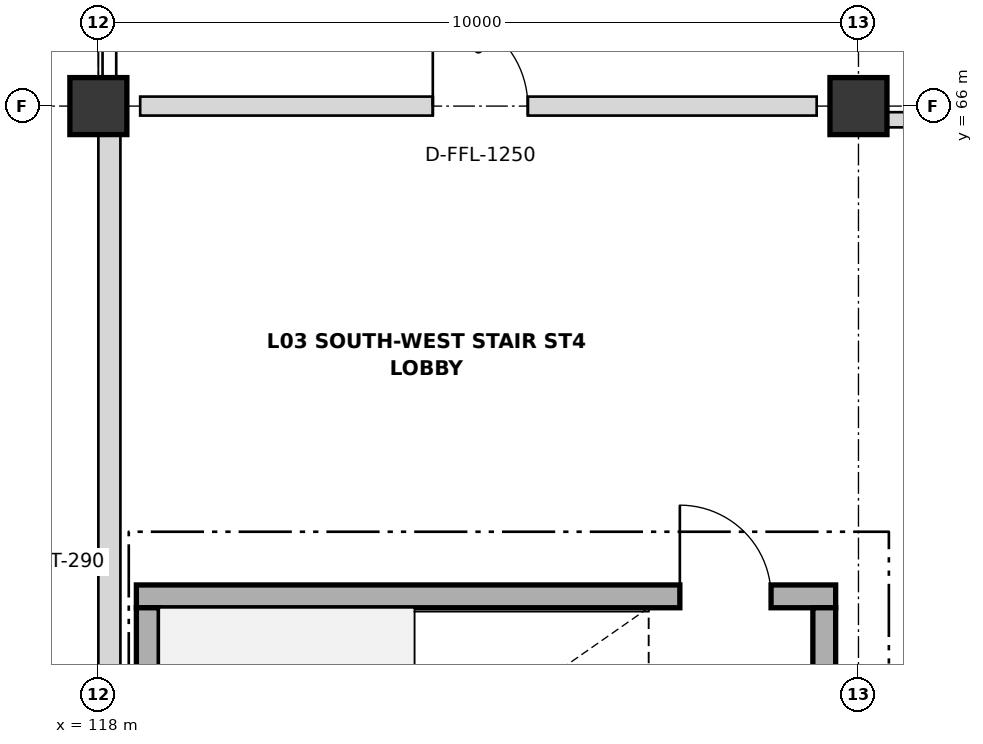
"""IFC4 building model, lengths in metres.
Left out: names, types, materials, properties, quantities, classifications, styles, units other than length and angle.
Written with IfcOpenShell. Run it as: python <this file> out.ifc"""

import sys

from ifc_helpers import new_model, si_unit, direction, frame, frame_2d, origin, origin_2d, place, context, subcontext, project, spatial, rectangle, extrude, element, fill, save


model = new_model("IFC4")
c1 = context("Model", 3, precision=1e-05, world=origin(), true_north=direction((0.0, 1.0)))
c2 = subcontext(c1, "Body", "Model", "MODEL_VIEW")
j1 = project(units=[si_unit("LENGTHUNIT", "METRE"), si_unit("PLANEANGLEUNIT", "RADIAN")], contexts=[c1])
p1 = place(None, origin())
s1 = spatial("IfcSite", under=j1, at=p1, CompositionType="ELEMENT")
p2 = place(p1, origin())
s2 = spatial("IfcBuilding", under=s1, at=p2, CompositionType="ELEMENT")
p3 = place(p2, frame((0.0, 0.0, 14.4)))
s3 = spatial("IfcBuildingStorey", under=s2, at=p3, CompositionType="ELEMENT", Elevation=14.4)
for number, where, z_axis, x_axis in (
    (1, (118.0, 66.0, 0.0), (0.0, 0.0, 1.0), (1.0, 0.0, 0.0)),
    (2, (128.0, 66.0, 0.0), (0.0, 0.0, 1.0), (1.0, 0.0, 0.0)),
):
    element("IfcColumn", number, at=place(p3, frame(where, z_axis=z_axis, x_axis=x_axis)), inside=s3, PredefinedType="COLUMN", context=c2, shape_type="SweptSolid", body=[
        extrude(rectangle(XDim=0.75, YDim=0.75, at=origin_2d()), origin(), (0.0, 0.0, 1.0), 4.2),
    ])
p4 = place(p3, frame((118.145, 54.37, 0.0), z_axis=(0.0, 0.0, 1.0), x_axis=(0.0, 1.0, 0.0)))
e3 = element("IfcWall", 3, at=p4, inside=s3, PredefinedType="SOLIDWALL", context=c2, shape_type="SweptSolid", body=[
    extrude(rectangle(XDim=11.26, YDim=0.29, at=frame_2d((5.63, 0.0))), origin(), (0.0, 0.0, 1.0), 3.078),
])
p5 = place(p3, frame((118.5, 59.55, 0.0), z_axis=(0.0, 0.0, 1.0), x_axis=(1.0, 0.0, 0.0)))
e4 = element("IfcWall", 4, at=p5, inside=s3, PredefinedType="SHEAR", context=c2, shape_type="SweptSolid", body=[
    extrude(rectangle(XDim=9.2, YDim=0.3, at=frame_2d((4.6, 0.0))), origin(), (0.0, 0.0, 1.0), 4.2),
])
p6 = place(p5, frame((7.15, 0.0, 0.0)))
e5 = element("IfcOpeningElement", 5, at=p6, cuts=e4, PredefinedType="OPENING", context=c2, shape_type="SweptSolid", body=[
    extrude(rectangle(XDim=1.2, YDim=2.15, at=frame_2d((0.6, 1.075))), frame((0.0, 0.16, 0.0), z_axis=(0.0, -1.0, 0.0), x_axis=(1.0, 0.0, 0.0)), (0.0, 0.0, 1.0), 0.32),
])
for number, where, z_axis, x_axis in (
    (6, (127.55, 59.4, 0.0), (0.0, 0.0, 1.0), (0.0, -1.0, 0.0)),
    (7, (118.65, 54.9, 0.0), (0.0, 0.0, 1.0), (0.0, 1.0, 0.0)),
):
    element("IfcWall", number, at=place(p3, frame(where, z_axis=z_axis, x_axis=x_axis)), inside=s3, PredefinedType="SHEAR", context=c2, shape_type="SweptSolid", body=[
        extrude(rectangle(XDim=4.5, YDim=0.3, at=frame_2d((2.25, 0.0))), origin(), (0.0, 0.0, 1.0), 4.2),
    ])
p7 = place(p3, frame((118.55, 66.0, 0.0), z_axis=(0.0, 0.0, 1.0), x_axis=(1.0, 0.0, 0.0)))
e8 = element("IfcWall", 8, at=p7, inside=s3, PredefinedType="PARTITIONING", context=c2, shape_type="SweptSolid", body=[
    extrude(rectangle(XDim=8.9, YDim=0.25, at=frame_2d((4.45, 0.0))), origin(), (0.0, 0.0, 1.0), 3.078),
])
p8 = place(p7, frame((3.85, 0.0, 0.0)))
e9 = element("IfcOpeningElement", 9, at=p8, cuts=e8, PredefinedType="OPENING", context=c2, shape_type="SweptSolid", body=[
    extrude(rectangle(XDim=1.25, YDim=2.15, at=frame_2d((0.625, 1.075))), frame((0.0, 0.135, 0.0), z_axis=(0.0, -1.0, 0.0), x_axis=(1.0, 0.0, 0.0)), (0.0, 0.0, 1.0), 0.27),
])
p9 = place(p3, frame((128.3, 65.82, 0.0), z_axis=(0.0, 0.0, 1.0), x_axis=(1.0, 0.0, 0.0)))
e10 = element("IfcWall", 10, at=p9, inside=s3, PredefinedType="PARTITIONING", context=c2, shape_type="SweptSolid", body=[
    extrude(rectangle(XDim=29.4, YDim=0.2, at=frame_2d((14.7, 0.0))), origin(), (0.0, 0.0, 1.0), 3.078),
])
p10 = place(p9, frame((14.25, 0.0, 0.0)))
e11 = element("IfcOpeningElement", 11, at=p10, cuts=e10, PredefinedType="OPENING", context=c2, shape_type="SweptSolid", body=[
    extrude(rectangle(XDim=0.9, YDim=2.2, at=frame_2d((0.45, 1.1))), frame((0.0, 0.11, 0.0), z_axis=(0.0, -1.0, 0.0), x_axis=(1.0, 0.0, 0.0)), (0.0, 0.0, 1.0), 0.22),
])
p11 = place(p6, origin())
e12 = element("IfcDoor", 12, at=p11, inside=s3, OperationType="SINGLE_SWING_LEFT", PredefinedType="DOOR", context=c2, shape_type="SweptSolid", body=[
    extrude(rectangle(XDim=1.2, YDim=2.15, at=frame_2d((0.6, 1.075))), frame((0.0, 0.025, 0.0), z_axis=(0.0, -1.0, 0.0), x_axis=(1.0, 0.0, 0.0)), (0.0, 0.0, 1.0), 0.05),
])
fill(e5, e12)
p12 = place(p8, origin())
e13 = element("IfcDoor", 13, at=p12, inside=s3, OperationType="SINGLE_SWING_LEFT", PredefinedType="DOOR", context=c2, shape_type="SweptSolid", body=[
    extrude(rectangle(XDim=1.25, YDim=2.15, at=frame_2d((0.625, 1.075))), frame((0.0, 0.025, 0.0), z_axis=(0.0, -1.0, 0.0), x_axis=(1.0, 0.0, 0.0)), (0.0, 0.0, 1.0), 0.05),
])
fill(e9, e13)
save(model, sys.argv[1])
